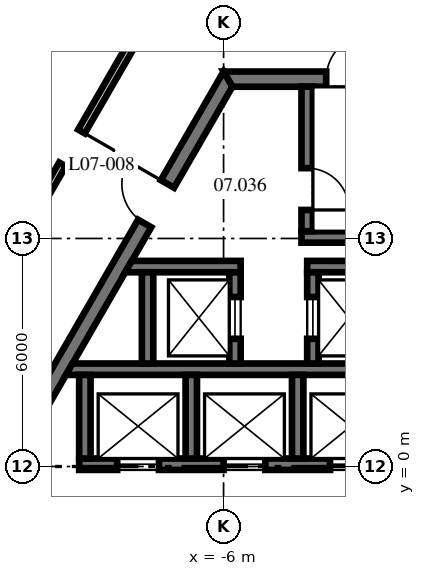
"""IFC4 building model, lengths in metres.
Left out: names, types, materials, properties, quantities, classifications, styles, units other than length and angle.
Written with IfcOpenShell. Run it as: python <this file> out.ifc"""

import sys

from ifc_helpers import new_model, si_unit, direction, frame, frame_2d, origin, place, context, subcontext, project, spatial, polyline, rectangle, outline, extrude, source, transform, mapped, element, fill, save


model = new_model("IFC4")
c1 = context("Model", 3, precision=1e-05, world=origin(), true_north=direction((0.0, 1.0)))
c2 = subcontext(c1, "Body", "Model", "MODEL_VIEW")
j1 = project(units=[si_unit("LENGTHUNIT", "METRE"), si_unit("PLANEANGLEUNIT", "RADIAN")], contexts=[c1])
p1 = place(None, origin())
s1 = spatial("IfcSite", under=j1, at=p1, CompositionType="ELEMENT")
p2 = place(p1, origin())
s2 = spatial("IfcBuilding", under=s1, at=p2, CompositionType="ELEMENT")
p3 = place(p2, frame((0.0, 0.0, 33.2)))
s3 = spatial("IfcBuildingStorey", under=s2, at=p3, CompositionType="ELEMENT", Elevation=33.2)
m1 = source(origin(), c2, "Body", "SweptSolid", [
    extrude(outline(polyline([(-0.115, -0.2), (11.885, -0.2), (11.654, 0.2), (0.115, 0.2), (-0.115, -0.2)])), origin(), (0.0, 0.0, 1.0), 4.1),
])
p4 = place(p3, frame((5.885, 10.192, 0.0), z_axis=(0.0, 0.0, 1.0), x_axis=(-1.0, 0.0, 0.0)))
e1 = element("IfcWall", 1, at=p4, inside=s3, PredefinedType="SHEAR", context=c2, shape_type="MappedRepresentation", body=[
    mapped(m1, transform((0.0, 0.0, 0.0), scale=1.0)),
])
p5 = place(p4, frame((7.985, 0.0, 0.0)))
e2 = element("IfcOpeningElement", 2, at=p5, cuts=e1, PredefinedType="OPENING", context=c2, shape_type="SweptSolid", body=[
    extrude(rectangle(XDim=1.2, YDim=2.1, at=frame_2d((0.6, 1.05))), frame((0.0, 0.21, 0.0), z_axis=(0.0, -1.0, 0.0), x_axis=(1.0, 0.0, 0.0)), (0.0, 0.0, 1.0), 0.42),
])
p6 = place(p3, frame((-5.885, 10.192, 0.0), z_axis=(0.0, 0.0, 1.0), x_axis=(-0.499996592174, -0.866027371285, 0.0)))
e3 = element("IfcWall", 3, at=p6, inside=s3, PredefinedType="SHEAR", context=c2, shape_type="MappedRepresentation", body=[
    mapped(m1, transform((0.0, 0.0, 0.0), scale=1.0)),
])
p7 = place(p6, frame((3.185, 0.0, 0.0)))
e4 = element("IfcOpeningElement", 4, at=p7, cuts=e3, PredefinedType="OPENING", context=c2, shape_type="SweptSolid", body=[
    extrude(rectangle(XDim=1.2, YDim=2.1, at=frame_2d((0.6, 1.05))), frame((0.0, 0.21, 0.0), z_axis=(0.0, -1.0, 0.0), x_axis=(1.0, 0.0, 0.0)), (0.0, 0.0, 1.0), 0.42),
])
p8 = place(p3, frame((-11.769, 0.0, 0.0), z_axis=(0.0, 0.0, 1.0), x_axis=(0.499996592174, -0.866027371285, 0.0)))
e5 = element("IfcWall", 5, at=p8, inside=s3, PredefinedType="SHEAR", context=c2, shape_type="MappedRepresentation", body=[
    mapped(m1, transform((0.0, 0.0, 0.0), scale=1.0)),
])
p9 = place(p8, frame((1.405, 0.0, 0.0)))
e6 = element("IfcOpeningElement", 6, at=p9, cuts=e5, PredefinedType="OPENING", context=c2, shape_type="SweptSolid", body=[
    extrude(rectangle(XDim=1.8, YDim=2.1, at=frame_2d((0.9, 1.05))), frame((0.0, 0.21, 0.0), z_axis=(0.0, -1.0, 0.0), x_axis=(1.0, 0.0, 0.0)), (0.0, 0.0, 1.0), 0.42),
])
p10 = place(p8, frame((7.915, 0.0, 0.0)))
e7 = element("IfcOpeningElement", 7, at=p10, cuts=e5, PredefinedType="OPENING", context=c2, shape_type="SweptSolid", body=[
    extrude(rectangle(XDim=1.2, YDim=2.1, at=frame_2d((0.6, 1.05))), frame((0.0, 0.21, 0.0), z_axis=(0.0, -1.0, 0.0), x_axis=(1.0, 0.0, 0.0)), (0.0, 0.0, 1.0), 0.42),
])
m2 = source(origin(), c2, "Body", "SweptSolid", [
    extrude(rectangle(XDim=11.5, YDim=0.3, at=frame_2d((5.75, 0.0))), origin(), (0.0, 0.0, 1.0), 4.1),
])
p11 = place(p3, frame((-9.8, 0.06, 0.0), z_axis=(0.0, 0.0, 1.0), x_axis=(1.0, 0.0, 0.0)))
e8 = element("IfcWall", 8, at=p11, inside=s3, PredefinedType="SHEAR", context=c2, shape_type="MappedRepresentation", body=[
    mapped(m2, transform((0.0, 0.0, 0.0), scale=1.0)),
])
p12 = place(p11, frame((1.0, 0.0, 0.0)))
e9 = element("IfcOpeningElement", 9, at=p12, cuts=e8, PredefinedType="OPENING", context=c2, shape_type="SweptSolid", body=[
    extrude(rectangle(XDim=1.1, YDim=2.1, at=frame_2d((0.55, 1.05))), frame((0.0, 0.16, 0.0), z_axis=(0.0, -1.0, 0.0), x_axis=(1.0, 0.0, 0.0)), (0.0, 0.0, 1.0), 0.32),
])
p13 = place(p11, frame((3.8, 0.0, 0.0)))
e10 = element("IfcOpeningElement", 10, at=p13, cuts=e8, PredefinedType="OPENING", context=c2, shape_type="SweptSolid", body=[
    extrude(rectangle(XDim=1.1, YDim=2.1, at=frame_2d((0.55, 1.05))), frame((0.0, 0.16, 0.0), z_axis=(0.0, -1.0, 0.0), x_axis=(1.0, 0.0, 0.0)), (0.0, 0.0, 1.0), 0.32),
])
p14 = place(p11, frame((6.6, 0.0, 0.0)))
e11 = element("IfcOpeningElement", 11, at=p14, cuts=e8, PredefinedType="OPENING", context=c2, shape_type="SweptSolid", body=[
    extrude(rectangle(XDim=1.1, YDim=2.1, at=frame_2d((0.55, 1.05))), frame((0.0, 0.16, 0.0), z_axis=(0.0, -1.0, 0.0), x_axis=(1.0, 0.0, 0.0)), (0.0, 0.0, 1.0), 0.32),
])
p15 = place(p11, frame((9.4, 0.0, 0.0)))
e12 = element("IfcOpeningElement", 12, at=p15, cuts=e8, PredefinedType="OPENING", context=c2, shape_type="SweptSolid", body=[
    extrude(rectangle(XDim=1.1, YDim=2.1, at=frame_2d((0.55, 1.05))), frame((0.0, 0.16, 0.0), z_axis=(0.0, -1.0, 0.0), x_axis=(1.0, 0.0, 0.0)), (0.0, 0.0, 1.0), 0.32),
])
m3 = source(origin(), c2, "Body", "SweptSolid", [
    extrude(outline(polyline([(11.2, -0.15), (-0.349, -0.15), (-0.176, 0.15), (11.2, 0.15), (11.2, -0.15)])), origin(), (0.0, 0.0, 1.0), 4.1),
])
p16 = place(p3, frame((-9.8, 2.56, 0.0), z_axis=(0.0, 0.0, 1.0), x_axis=(1.0, 0.0, 0.0)))
e13 = element("IfcWall", 13, at=p16, inside=s3, PredefinedType="SHEAR", context=c2, shape_type="MappedRepresentation", body=[
    mapped(m3, transform((0.0, 0.0, 0.0), scale=1.0)),
])
m4 = source(origin(), c2, "Body", "SweptSolid", [
    extrude(rectangle(XDim=2.2, YDim=0.3, at=frame_2d((1.1, 0.0))), origin(), (0.0, 0.0, 1.0), 4.1),
])
p17 = place(p3, frame((-9.65, 0.21, 0.0), z_axis=(0.0, 0.0, 1.0), x_axis=(0.0, 1.0, 0.0)))
e14 = element("IfcWall", 14, at=p17, inside=s3, PredefinedType="SHEAR", context=c2, shape_type="MappedRepresentation", body=[
    mapped(m4, transform((0.0, 0.0, 0.0), scale=1.0)),
])
m5 = source(origin(), c2, "Body", "SweptSolid", [
    extrude(rectangle(XDim=7.9, YDim=0.3, at=frame_2d((3.95, 0.0))), origin(), (0.0, 0.0, 1.0), 4.1),
])
p18 = place(p3, frame((-3.95, 6.04, 0.0), z_axis=(0.0, 0.0, 1.0), x_axis=(1.0, 0.0, 0.0)))
e15 = element("IfcWall", 15, at=p18, inside=s3, PredefinedType="SHEAR", context=c2, shape_type="MappedRepresentation", body=[
    mapped(m5, transform((0.0, 0.0, 0.0), scale=1.0)),
])
m6 = source(origin(), c2, "Body", "SweptSolid", [
    extrude(outline(polyline([(0.0, -0.15), (0.0, 0.15), (3.804, 0.15), (3.804, -0.15), (0.0, -0.15)])), origin(), (0.0, 0.0, 1.0), 4.1),
])
p19 = place(p3, frame((-3.8, 6.19, 0.0), z_axis=(0.0, 0.0, 1.0), x_axis=(0.0, 1.0, 0.0)))
e16 = element("IfcWall", 16, at=p19, inside=s3, PredefinedType="SHEAR", context=c2, shape_type="MappedRepresentation", body=[
    mapped(m6, transform((0.0, 0.0, 0.0), scale=1.0)),
])
p20 = place(p19, frame((0.56, 0.0, 0.0)))
e17 = element("IfcOpeningElement", 17, at=p20, cuts=e16, PredefinedType="OPENING", context=c2, shape_type="SweptSolid", body=[
    extrude(rectangle(XDim=1.1, YDim=2.1, at=frame_2d((0.55, 1.05))), frame((0.0, 0.16, 0.0), z_axis=(0.0, -1.0, 0.0), x_axis=(1.0, 0.0, 0.0)), (0.0, 0.0, 1.0), 0.32),
])
m7 = source(origin(), c2, "Body", "SweptSolid", [
    extrude(outline(polyline([(2.6, -0.15), (-0.44, -0.15), (-0.267, 0.15), (2.6, 0.15), (2.6, -0.15)])), origin(), (0.0, 0.0, 1.0), 4.1),
])
p21 = place(p3, frame((-8.15, 5.26, 0.0), z_axis=(0.0, 0.0, 1.0), x_axis=(1.0, 0.0, 0.0)))
e18 = element("IfcWall", 18, at=p21, inside=s3, PredefinedType="SHEAR", context=c2, shape_type="MappedRepresentation", body=[
    mapped(m7, transform((0.0, 0.0, 0.0), scale=1.0)),
])
m8 = source(origin(), c2, "Body", "SweptSolid", [
    extrude(rectangle(XDim=2.4, YDim=0.3, at=frame_2d((1.2, 0.0))), origin(), (0.0, 0.0, 1.0), 4.1),
])
p22 = place(p3, frame((-8.0, 2.71, 0.0), z_axis=(0.0, 0.0, 1.0), x_axis=(0.0, 1.0, 0.0)))
e19 = element("IfcWall", 19, at=p22, inside=s3, PredefinedType="SHEAR", context=c2, shape_type="MappedRepresentation", body=[
    mapped(m8, transform((0.0, 0.0, 0.0), scale=1.0)),
])
p23 = place(p3, frame((-5.7, 2.71, 0.0), z_axis=(0.0, 0.0, 1.0), x_axis=(0.0, 1.0, 0.0)))
e20 = element("IfcWall", 20, at=p23, inside=s3, PredefinedType="SHEAR", context=c2, shape_type="MappedRepresentation", body=[
    mapped(m8, transform((0.0, 0.0, 0.0), scale=1.0)),
])
p24 = place(p23, frame((0.65, 0.0, 0.0)))
e21 = element("IfcOpeningElement", 21, at=p24, cuts=e20, PredefinedType="OPENING", context=c2, shape_type="SweptSolid", body=[
    extrude(rectangle(XDim=1.1, YDim=2.1, at=frame_2d((0.55, 1.05))), frame((0.0, 0.16, 0.0), z_axis=(0.0, -1.0, 0.0), x_axis=(1.0, 0.0, 0.0)), (0.0, 0.0, 1.0), 0.32),
])
m9 = source(origin(), c2, "Body", "SweptSolid", [
    extrude(rectangle(XDim=2.6, YDim=0.3, at=frame_2d((1.3, 0.0))), origin(), (0.0, 0.0, 1.0), 4.1),
])
p25 = place(p3, frame((-3.8, 5.26, 0.0), z_axis=(0.0, 0.0, 1.0), x_axis=(1.0, 0.0, 0.0)))
e22 = element("IfcWall", 22, at=p25, inside=s3, PredefinedType="SHEAR", context=c2, shape_type="MappedRepresentation", body=[
    mapped(m9, transform((0.0, 0.0, 0.0), scale=1.0)),
])
p26 = place(p3, frame((-3.65, 2.71, 0.0), z_axis=(0.0, 0.0, 1.0), x_axis=(0.0, 1.0, 0.0)))
e23 = element("IfcWall", 23, at=p26, inside=s3, PredefinedType="SHEAR", context=c2, shape_type="MappedRepresentation", body=[
    mapped(m8, transform((0.0, 0.0, 0.0), scale=1.0)),
])
p27 = place(p26, frame((0.65, 0.0, 0.0)))
e24 = element("IfcOpeningElement", 24, at=p27, cuts=e23, PredefinedType="OPENING", context=c2, shape_type="SweptSolid", body=[
    extrude(rectangle(XDim=1.1, YDim=2.1, at=frame_2d((0.55, 1.05))), frame((0.0, 0.16, 0.0), z_axis=(0.0, -1.0, 0.0), x_axis=(1.0, 0.0, 0.0)), (0.0, 0.0, 1.0), 0.32),
])
for number, where, z_axis, x_axis in (
    (25, (-6.85, 0.21, 0.0), (0.0, 0.0, 1.0), (0.0, 1.0, 0.0)),
    (26, (-4.05, 0.21, 0.0), (0.0, 0.0, 1.0), (0.0, 1.0, 0.0)),
):
    element("IfcWall", number, at=place(p3, frame(where, z_axis=z_axis, x_axis=x_axis)), inside=s3, PredefinedType="SHEAR", context=c2, shape_type="MappedRepresentation", body=[
        mapped(m4, transform((0.0, 0.0, 0.0), scale=1.0)),
    ])
m10 = source(origin(), c2, "Body", "SweptSolid", [
    extrude(rectangle(XDim=14.759, YDim=0.2, at=frame_2d((7.379, 0.0))), origin(), (0.0, 0.0, 1.0), 4.1),
])
p28 = place(p3, frame((-14.794, 0.061, 0.0), z_axis=(0.0, 0.0, 1.0), x_axis=(0.49999260588, 0.86602967274, 0.0)))
e27 = element("IfcWall", 27, at=p28, inside=s3, PredefinedType="PARTITIONING", context=c2, shape_type="MappedRepresentation", body=[
    mapped(m10, transform((0.0, 0.0, 0.0), scale=1.0)),
])
p29 = place(p28, frame((9.109, 0.0, 0.0)))
e28 = element("IfcOpeningElement", 28, at=p29, cuts=e27, PredefinedType="OPENING", context=c2, shape_type="SweptSolid", body=[
    extrude(rectangle(XDim=1.0, YDim=2.1, at=frame_2d((0.5, 1.05))), frame((0.0, 0.11, 0.0), z_axis=(0.0, -1.0, 0.0), x_axis=(1.0, 0.0, 0.0)), (0.0, 0.0, 1.0), 0.22),
])
p30 = place(p5, frame((1.2, 0.0, 0.0), z_axis=(0.0, 0.0, 1.0), x_axis=(-1.0, 0.0, 0.0)))
e29 = element("IfcDoor", 29, at=p30, inside=s3, OperationType="SINGLE_SWING_RIGHT", PredefinedType="DOOR", context=c2, shape_type="SweptSolid", body=[
    extrude(rectangle(XDim=1.2, YDim=2.1, at=frame_2d((0.6, 1.05))), frame((0.0, 0.025, 0.0), z_axis=(0.0, -1.0, 0.0), x_axis=(1.0, 0.0, 0.0)), (0.0, 0.0, 1.0), 0.05),
])
fill(e2, e29)
p31 = place(p7, frame((1.2, 0.0, 0.0), z_axis=(0.0, 0.0, 1.0), x_axis=(-1.0, 0.0, 0.0)))
e30 = element("IfcDoor", 30, at=p31, inside=s3, OperationType="SINGLE_SWING_RIGHT", PredefinedType="DOOR", context=c2, shape_type="SweptSolid", body=[
    extrude(rectangle(XDim=1.2, YDim=2.1, at=frame_2d((0.6, 1.05))), frame((0.0, 0.025, 0.0), z_axis=(0.0, -1.0, 0.0), x_axis=(1.0, 0.0, 0.0)), (0.0, 0.0, 1.0), 0.05),
])
fill(e4, e30)
p32 = place(p20, frame((1.1, 0.0, 0.0), z_axis=(0.0, 0.0, 1.0), x_axis=(-1.0, 0.0, 0.0)))
e31 = element("IfcDoor", 31, at=p32, inside=s3, OperationType="SINGLE_SWING_RIGHT", PredefinedType="DOOR", context=c2, shape_type="SweptSolid", body=[
    extrude(rectangle(XDim=1.1, YDim=2.1, at=frame_2d((0.55, 1.05))), frame((0.0, 0.025, 0.0), z_axis=(0.0, -1.0, 0.0), x_axis=(1.0, 0.0, 0.0)), (0.0, 0.0, 1.0), 0.05),
])
fill(e17, e31)
p33 = place(p12, origin())
e32 = element("IfcDoor", 32, at=p33, inside=s3, OperationType="DOUBLE_DOOR_SLIDING", PredefinedType="DOOR", context=c2, shape_type="SweptSolid", body=[
    extrude(rectangle(XDim=1.1, YDim=2.1, at=frame_2d((0.55, 1.05))), frame((0.0, 0.025, 0.0), z_axis=(0.0, -1.0, 0.0), x_axis=(1.0, 0.0, 0.0)), (0.0, 0.0, 1.0), 0.05),
])
fill(e9, e32)
p34 = place(p13, origin())
e33 = element("IfcDoor", 33, at=p34, inside=s3, OperationType="DOUBLE_DOOR_SLIDING", PredefinedType="DOOR", context=c2, shape_type="SweptSolid", body=[
    extrude(rectangle(XDim=1.1, YDim=2.1, at=frame_2d((0.55, 1.05))), frame((0.0, 0.025, 0.0), z_axis=(0.0, -1.0, 0.0), x_axis=(1.0, 0.0, 0.0)), (0.0, 0.0, 1.0), 0.05),
])
fill(e10, e33)
p35 = place(p14, origin())
e34 = element("IfcDoor", 34, at=p35, inside=s3, OperationType="DOUBLE_DOOR_SLIDING", PredefinedType="DOOR", context=c2, shape_type="SweptSolid", body=[
    extrude(rectangle(XDim=1.1, YDim=2.1, at=frame_2d((0.55, 1.05))), frame((0.0, 0.025, 0.0), z_axis=(0.0, -1.0, 0.0), x_axis=(1.0, 0.0, 0.0)), (0.0, 0.0, 1.0), 0.05),
])
fill(e11, e34)
p36 = place(p24, origin())
e35 = element("IfcDoor", 35, at=p36, inside=s3, OperationType="DOUBLE_DOOR_SLIDING", PredefinedType="DOOR", context=c2, shape_type="SweptSolid", body=[
    extrude(rectangle(XDim=1.1, YDim=2.1, at=frame_2d((0.55, 1.05))), frame((0.0, 0.025, 0.0), z_axis=(0.0, -1.0, 0.0), x_axis=(1.0, 0.0, 0.0)), (0.0, 0.0, 1.0), 0.05),
])
fill(e21, e35)
p37 = place(p27, origin())
e36 = element("IfcDoor", 36, at=p37, inside=s3, OperationType="DOUBLE_DOOR_SLIDING", PredefinedType="DOOR", context=c2, shape_type="SweptSolid", body=[
    extrude(rectangle(XDim=1.1, YDim=2.1, at=frame_2d((0.55, 1.05))), frame((0.0, 0.025, 0.0), z_axis=(0.0, -1.0, 0.0), x_axis=(1.0, 0.0, 0.0)), (0.0, 0.0, 1.0), 0.05),
])
fill(e24, e36)
p38 = place(p29, origin())
e37 = element("IfcDoor", 37, at=p38, inside=s3, OperationType="SINGLE_SWING_RIGHT", PredefinedType="DOOR", context=c2, shape_type="SweptSolid", body=[
    extrude(rectangle(XDim=1.0, YDim=2.1, at=frame_2d((0.5, 1.05))), frame((0.0, 0.025, 0.0), z_axis=(0.0, -1.0, 0.0), x_axis=(1.0, 0.0, 0.0)), (0.0, 0.0, 1.0), 0.05),
])
fill(e28, e37)
save(model, sys.argv[1])
